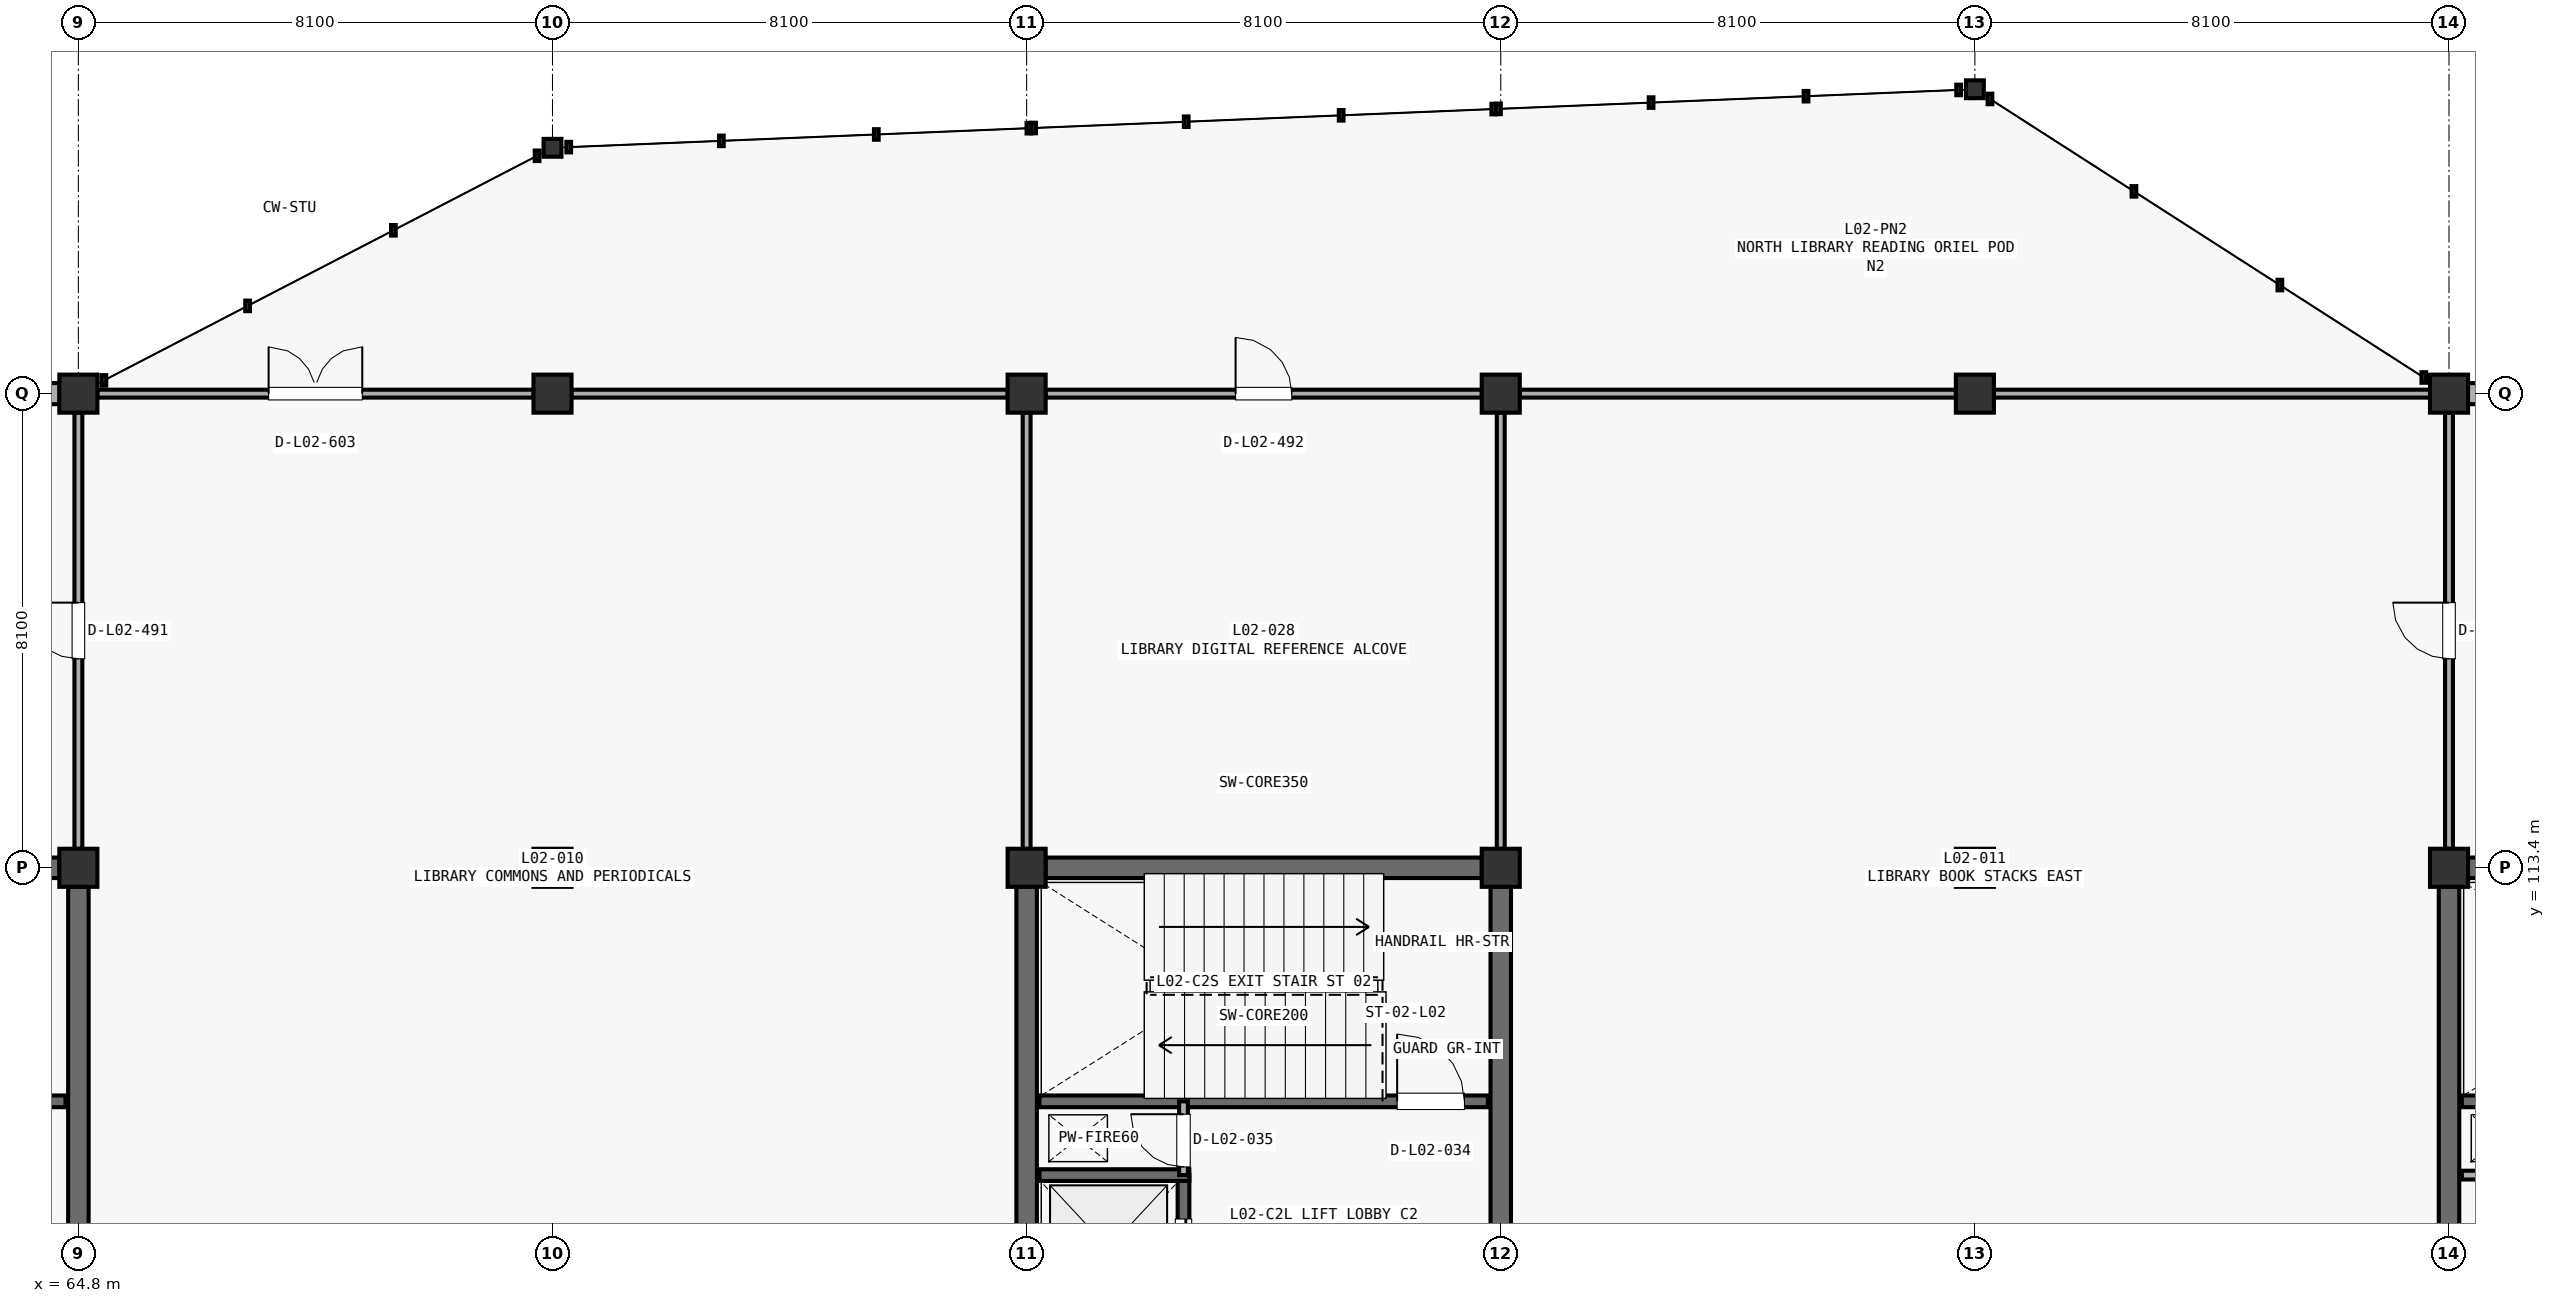
"""IFC4 building model, lengths in metres.
Left out: names, types, materials, properties, quantities, classifications, styles, units other than length and angle.
Written with IfcOpenShell. Run it as: python <this file> out.ifc"""

import sys

from ifc_helpers import new_model, si_unit, direction, frame, frame_2d, origin, origin_2d, place, context, subcontext, project, spatial, rectangle, hollow_rectangle, extrude, element, fill, save


model = new_model("IFC4")
c1 = context("Model", 3, precision=1e-05, world=origin(), true_north=direction((0.0, 1.0)))
c2 = subcontext(c1, "Body", "Model", "MODEL_VIEW")
j1 = project(units=[si_unit("LENGTHUNIT", "METRE"), si_unit("PLANEANGLEUNIT", "RADIAN")], contexts=[c1])
p1 = place(None, origin())
s1 = spatial("IfcSite", under=j1, at=p1, CompositionType="ELEMENT")
p2 = place(p1, origin())
s2 = spatial("IfcBuilding", under=s1, at=p2, CompositionType="ELEMENT")
p3 = place(p2, frame((0.0, 0.0, 9.69)))
s3 = spatial("IfcBuildingStorey", under=s2, at=p3, CompositionType="ELEMENT", Elevation=9.69)
for number, where, z_axis, x_axis in (
    (1, (64.8, 113.4, 0.0), (0.0, 0.0, 1.0), (1.0, 0.0, 0.0)),
    (2, (64.8, 121.5, 0.0), (0.0, 0.0, 1.0), (1.0, 0.0, 0.0)),
    (3, (72.9, 113.4, 0.0), (0.0, 0.0, 1.0), (1.0, 0.0, 0.0)),
    (4, (72.9, 121.5, 0.0), (0.0, 0.0, 1.0), (1.0, 0.0, 0.0)),
    (5, (81.0, 113.4, 0.0), (0.0, 0.0, 1.0), (1.0, 0.0, 0.0)),
    (6, (81.0, 121.5, 0.0), (0.0, 0.0, 1.0), (1.0, 0.0, 0.0)),
    (7, (89.1, 113.4, 0.0), (0.0, 0.0, 1.0), (1.0, 0.0, 0.0)),
    (8, (89.1, 121.5, 0.0), (0.0, 0.0, 1.0), (1.0, 0.0, 0.0)),
    (9, (97.2, 113.4, 0.0), (0.0, 0.0, 1.0), (1.0, 0.0, 0.0)),
    (10, (97.2, 121.5, 0.0), (0.0, 0.0, 1.0), (1.0, 0.0, 0.0)),
    (11, (105.3, 113.4, 0.0), (0.0, 0.0, 1.0), (1.0, 0.0, 0.0)),
    (12, (105.3, 121.5, 0.0), (0.0, 0.0, 1.0), (1.0, 0.0, 0.0)),
):
    element("IfcColumn", number, at=place(p3, frame(where, z_axis=z_axis, x_axis=x_axis)), inside=s3, PredefinedType="COLUMN", context=c2, shape_type="SweptSolid", body=[
        extrude(rectangle(XDim=0.65, YDim=0.65, at=origin_2d()), origin(), (0.0, 0.0, 1.0), 4.42),
    ])
for number, where, z_axis, x_axis in (
    (13, (72.9, 125.7, 0.0), (0.0, 0.0, 1.0), (1.0, 0.0, 0.0)),
    (14, (97.2, 126.7, 0.0), (0.0, 0.0, 1.0), (1.0, 0.0, 0.0)),
):
    element("IfcColumn", number, at=place(p3, frame(where, z_axis=z_axis, x_axis=x_axis)), inside=s3, PredefinedType="COLUMN", context=c2, shape_type="SweptSolid", body=[
        extrude(hollow_rectangle(XDim=0.305, YDim=0.305, WallThickness=0.013, InnerFilletRadius=0.013, OuterFilletRadius=0.025, at=origin_2d()), origin(), (0.0, 0.0, 1.0), 4.42),
    ])
p4 = place(p3, frame((57.023, 121.5, 0.0), z_axis=(0.0, 0.0, 1.0), x_axis=(1.0, 0.0, 0.0)))
e15 = element("IfcWall", 15, at=p4, inside=s3, PredefinedType="STANDARD", context=c2, shape_type="SweptSolid", body=[
    extrude(rectangle(XDim=7.454, YDim=0.36, at=frame_2d((3.727, 0.0))), origin(), (0.0, 0.0, 1.0), 3.332),
])
p5 = place(p4, frame((3.002, 0.0, 0.85)))
e16 = element("IfcOpeningElement", 16, at=p5, cuts=e15, PredefinedType="OPENING", context=c2, shape_type="SweptSolid", body=[
    extrude(rectangle(XDim=1.45, YDim=1.7, at=frame_2d((0.725, 0.85))), frame((0.0, 0.19, 0.0), z_axis=(0.0, -1.0, 0.0), x_axis=(1.0, 0.0, 0.0)), (0.0, 0.0, 1.0), 0.38),
])
p6 = place(p3, frame((105.623, 121.5, 0.0), z_axis=(0.0, 0.0, 1.0), x_axis=(1.0, 0.0, 0.0)))
e17 = element("IfcWall", 17, at=p6, inside=s3, PredefinedType="STANDARD", context=c2, shape_type="SweptSolid", body=[
    extrude(rectangle(XDim=7.454, YDim=0.36, at=frame_2d((3.727, 0.0))), origin(), (0.0, 0.0, 1.0), 3.492),
])
p7 = place(p6, frame((2.352, 0.0, 0.85)))
e18 = element("IfcOpeningElement", 18, at=p7, cuts=e17, PredefinedType="OPENING", context=c2, shape_type="SweptSolid", body=[
    extrude(rectangle(XDim=2.75, YDim=1.7, at=frame_2d((1.375, 0.85))), frame((0.0, 0.19, 0.0), z_axis=(0.0, -1.0, 0.0), x_axis=(1.0, 0.0, 0.0)), (0.0, 0.0, 1.0), 0.38),
])
p8 = place(p3, frame((81.323, 113.4, 0.0), z_axis=(0.0, 0.0, 1.0), x_axis=(1.0, 0.0, 0.0)))
e19 = element("IfcWall", 19, at=p8, inside=s3, PredefinedType="SHEAR", context=c2, shape_type="SweptSolid", body=[
    extrude(rectangle(XDim=7.454, YDim=0.35, at=frame_2d((3.727, 0.0))), origin(), (0.0, 0.0, 1.0), 4.142),
])
for number, where, z_axis, x_axis in (
    (20, (81.0, 105.623, 0.0), (0.0, 0.0, 1.0), (0.0, 1.0, 0.0)),
    (21, (89.1, 105.623, 0.0), (0.0, 0.0, 1.0), (0.0, 1.0, 0.0)),
):
    element("IfcWall", number, at=place(p3, frame(where, z_axis=z_axis, x_axis=x_axis)), inside=s3, PredefinedType="SHEAR", context=c2, shape_type="SweptSolid", body=[
        extrude(rectangle(XDim=7.454, YDim=0.35, at=frame_2d((3.727, 0.0))), origin(), (0.0, 0.0, 1.0), 4.142),
    ])
p9 = place(p3, frame((81.22, 109.41, 0.0), z_axis=(0.0, 0.0, 1.0), x_axis=(1.0, 0.0, 0.0)))
e22 = element("IfcWall", 22, at=p9, inside=s3, PredefinedType="SHEAR", context=c2, shape_type="SweptSolid", body=[
    extrude(rectangle(XDim=7.66, YDim=0.2, at=frame_2d((3.83, 0.0))), origin(), (0.0, 0.0, 1.0), 4.142),
])
p10 = place(p9, frame((6.11, 0.0, 0.0)))
e23 = element("IfcOpeningElement", 23, at=p10, cuts=e22, PredefinedType="OPENING", context=c2, shape_type="SweptSolid", body=[
    extrude(rectangle(XDim=1.15, YDim=2.2, at=frame_2d((0.575, 1.1))), frame((0.0, 0.11, 0.0), z_axis=(0.0, -1.0, 0.0), x_axis=(1.0, 0.0, 0.0)), (0.0, 0.0, 1.0), 0.22),
])
p11 = place(p3, frame((83.68, 105.55, 0.0), z_axis=(0.0, 0.0, 1.0), x_axis=(0.0, 1.0, 0.0)))
e24 = element("IfcWall", 24, at=p11, inside=s3, PredefinedType="SHEAR", context=c2, shape_type="SweptSolid", body=[
    extrude(rectangle(XDim=2.6, YDim=0.2, at=frame_2d((1.3, 0.0))), origin(), (0.0, 0.0, 1.0), 4.142),
])
p12 = place(p11, frame((0.75, 0.0, 0.0)))
e25 = element("IfcOpeningElement", 25, at=p12, cuts=e24, PredefinedType="OPENING", context=c2, shape_type="SweptSolid", body=[
    extrude(rectangle(XDim=1.1, YDim=2.2, at=frame_2d((0.55, 1.1))), frame((0.0, 0.11, 0.0), z_axis=(0.0, -1.0, 0.0), x_axis=(1.0, 0.0, 0.0)), (0.0, 0.0, 1.0), 0.22),
])
p13 = place(p3, frame((81.22, 108.15, 0.0), z_axis=(0.0, 0.0, 1.0), x_axis=(1.0, 0.0, 0.0)))
e26 = element("IfcWall", 26, at=p13, inside=s3, PredefinedType="SHEAR", context=c2, shape_type="SweptSolid", body=[
    extrude(rectangle(XDim=2.56, YDim=0.2, at=frame_2d((1.28, 0.0))), origin(), (0.0, 0.0, 1.0), 4.142),
])
p14 = place(p3, frame((83.68, 108.15, 0.0), z_axis=(0.0, 0.0, 1.0), x_axis=(0.0, 1.0, 0.0)))
e27 = element("IfcWall", 27, at=p14, inside=s3, PredefinedType="PARTITIONING", context=c2, shape_type="SweptSolid", body=[
    extrude(rectangle(XDim=1.26, YDim=0.15, at=frame_2d((0.63, 0.0))), origin(), (0.0, 0.0, 1.0), 4.142),
])
p15 = place(p14, frame((0.14, 0.0, 0.0)))
e28 = element("IfcOpeningElement", 28, at=p15, cuts=e27, PredefinedType="OPENING", context=c2, shape_type="SweptSolid", body=[
    extrude(rectangle(XDim=0.9, YDim=2.15, at=frame_2d((0.45, 1.075))), frame((0.0, 0.085, 0.0), z_axis=(0.0, -1.0, 0.0), x_axis=(1.0, 0.0, 0.0)), (0.0, 0.0, 1.0), 0.17),
])
p16 = place(p3, frame((57.023, 113.4, 0.0), z_axis=(0.0, 0.0, 1.0), x_axis=(1.0, 0.0, 0.0)))
e29 = element("IfcWall", 29, at=p16, inside=s3, PredefinedType="SHEAR", context=c2, shape_type="SweptSolid", body=[
    extrude(rectangle(XDim=7.454, YDim=0.35, at=frame_2d((3.727, 0.0))), origin(), (0.0, 0.0, 1.0), 4.082),
])
p17 = place(p3, frame((64.8, 105.623, 0.0), z_axis=(0.0, 0.0, 1.0), x_axis=(0.0, 1.0, 0.0)))
e30 = element("IfcWall", 30, at=p17, inside=s3, PredefinedType="SHEAR", context=c2, shape_type="SweptSolid", body=[
    extrude(rectangle(XDim=7.454, YDim=0.35, at=frame_2d((3.727, 0.0))), origin(), (0.0, 0.0, 1.0), 4.082),
])
p18 = place(p3, frame((56.92, 109.41, 0.0), z_axis=(0.0, 0.0, 1.0), x_axis=(1.0, 0.0, 0.0)))
e31 = element("IfcWall", 31, at=p18, inside=s3, PredefinedType="SHEAR", context=c2, shape_type="SweptSolid", body=[
    extrude(rectangle(XDim=7.66, YDim=0.2, at=frame_2d((3.83, 0.0))), origin(), (0.0, 0.0, 1.0), 4.082),
])
p19 = place(p18, frame((6.11, 0.0, 0.0)))
e32 = element("IfcOpeningElement", 32, at=p19, cuts=e31, PredefinedType="OPENING", context=c2, shape_type="SweptSolid", body=[
    extrude(rectangle(XDim=1.15, YDim=2.2, at=frame_2d((0.575, 1.1))), frame((0.0, 0.11, 0.0), z_axis=(0.0, -1.0, 0.0), x_axis=(1.0, 0.0, 0.0)), (0.0, 0.0, 1.0), 0.22),
])
for number, where, z_axis, x_axis in (
    (33, (105.623, 113.4, 0.0), (0.0, 0.0, 1.0), (1.0, 0.0, 0.0)),
    (34, (105.3, 105.623, 0.0), (0.0, 0.0, 1.0), (0.0, 1.0, 0.0)),
):
    element("IfcWall", number, at=place(p3, frame(where, z_axis=z_axis, x_axis=x_axis)), inside=s3, PredefinedType="SHEAR", context=c2, shape_type="SweptSolid", body=[
        extrude(rectangle(XDim=7.454, YDim=0.35, at=frame_2d((3.727, 0.0))), origin(), (0.0, 0.0, 1.0), 4.142),
    ])
p20 = place(p3, frame((105.52, 109.41, 0.0), z_axis=(0.0, 0.0, 1.0), x_axis=(1.0, 0.0, 0.0)))
e35 = element("IfcWall", 35, at=p20, inside=s3, PredefinedType="SHEAR", context=c2, shape_type="SweptSolid", body=[
    extrude(rectangle(XDim=7.66, YDim=0.2, at=frame_2d((3.83, 0.0))), origin(), (0.0, 0.0, 1.0), 4.142),
])
p21 = place(p20, frame((6.11, 0.0, 0.0)))
e36 = element("IfcOpeningElement", 36, at=p21, cuts=e35, PredefinedType="OPENING", context=c2, shape_type="SweptSolid", body=[
    extrude(rectangle(XDim=1.15, YDim=2.2, at=frame_2d((0.575, 1.1))), frame((0.0, 0.11, 0.0), z_axis=(0.0, -1.0, 0.0), x_axis=(1.0, 0.0, 0.0)), (0.0, 0.0, 1.0), 0.22),
])
p22 = place(p3, frame((105.52, 108.15, 0.0), z_axis=(0.0, 0.0, 1.0), x_axis=(1.0, 0.0, 0.0)))
e37 = element("IfcWall", 37, at=p22, inside=s3, PredefinedType="PARTITIONING", context=c2, shape_type="SweptSolid", body=[
    extrude(rectangle(XDim=2.53, YDim=0.15, at=frame_2d((1.265, 0.0))), origin(), (0.0, 0.0, 1.0), 4.142),
])
p23 = place(p3, frame((81.0, 113.723, 0.0), z_axis=(0.0, 0.0, 1.0), x_axis=(0.0, 1.0, 0.0)))
e38 = element("IfcWall", 38, at=p23, inside=s3, PredefinedType="PARTITIONING", context=c2, shape_type="SweptSolid", body=[
    extrude(rectangle(XDim=7.454, YDim=0.135, at=frame_2d((3.727, 0.0))), origin(), (0.0, 0.0, 1.0), 3.542),
])
p24 = place(p3, frame((64.8, 113.723, 0.0), z_axis=(0.0, 0.0, 1.0), x_axis=(0.0, 1.0, 0.0)))
e39 = element("IfcWall", 39, at=p24, inside=s3, PredefinedType="PARTITIONING", context=c2, shape_type="SweptSolid", body=[
    extrude(rectangle(XDim=7.454, YDim=0.135, at=frame_2d((3.727, 0.0))), origin(), (0.0, 0.0, 1.0), 3.232),
])
p25 = place(p24, frame((3.247, 0.0, 0.0)))
e40 = element("IfcOpeningElement", 40, at=p25, cuts=e39, PredefinedType="OPENING", context=c2, shape_type="SweptSolid", body=[
    extrude(rectangle(XDim=0.96, YDim=2.15, at=frame_2d((0.48, 1.075))), frame((0.0, 0.078, 0.0), z_axis=(0.0, -1.0, 0.0), x_axis=(1.0, 0.0, 0.0)), (0.0, 0.0, 1.0), 0.155),
])
p26 = place(p3, frame((65.123, 121.5, 0.0), z_axis=(0.0, 0.0, 1.0), x_axis=(1.0, 0.0, 0.0)))
e41 = element("IfcWall", 41, at=p26, inside=s3, PredefinedType="PARTITIONING", context=c2, shape_type="SweptSolid", body=[
    extrude(rectangle(XDim=7.454, YDim=0.135, at=frame_2d((3.727, 0.0))), origin(), (0.0, 0.0, 1.0), 3.492),
])
p27 = place(p26, frame((2.927, 0.0, 0.0)))
e42 = element("IfcOpeningElement", 42, at=p27, cuts=e41, PredefinedType="OPENING", context=c2, shape_type="SweptSolid", body=[
    extrude(rectangle(XDim=1.6, YDim=2.2, at=frame_2d((0.8, 1.1))), frame((0.0, 0.078, 0.0), z_axis=(0.0, -1.0, 0.0), x_axis=(1.0, 0.0, 0.0)), (0.0, 0.0, 1.0), 0.155),
])
p28 = place(p3, frame((73.223, 121.5, 0.0), z_axis=(0.0, 0.0, 1.0), x_axis=(1.0, 0.0, 0.0)))
e43 = element("IfcWall", 43, at=p28, inside=s3, PredefinedType="PARTITIONING", context=c2, shape_type="SweptSolid", body=[
    extrude(rectangle(XDim=7.454, YDim=0.135, at=frame_2d((3.727, 0.0))), origin(), (0.0, 0.0, 1.0), 3.727),
])
p29 = place(p3, frame((105.3, 113.723, 0.0), z_axis=(0.0, 0.0, 1.0), x_axis=(0.0, 1.0, 0.0)))
e44 = element("IfcWall", 44, at=p29, inside=s3, PredefinedType="PARTITIONING", context=c2, shape_type="SweptSolid", body=[
    extrude(rectangle(XDim=7.454, YDim=0.135, at=frame_2d((3.727, 0.0))), origin(), (0.0, 0.0, 1.0), 3.292),
])
p30 = place(p29, frame((3.247, 0.0, 0.0)))
e45 = element("IfcOpeningElement", 45, at=p30, cuts=e44, PredefinedType="OPENING", context=c2, shape_type="SweptSolid", body=[
    extrude(rectangle(XDim=0.96, YDim=2.15, at=frame_2d((0.48, 1.075))), frame((0.0, 0.078, 0.0), z_axis=(0.0, -1.0, 0.0), x_axis=(1.0, 0.0, 0.0)), (0.0, 0.0, 1.0), 0.155),
])
p31 = place(p3, frame((89.1, 113.723, 0.0), z_axis=(0.0, 0.0, 1.0), x_axis=(0.0, 1.0, 0.0)))
e46 = element("IfcWall", 46, at=p31, inside=s3, PredefinedType="PARTITIONING", context=c2, shape_type="SweptSolid", body=[
    extrude(rectangle(XDim=7.454, YDim=0.135, at=frame_2d((3.727, 0.0))), origin(), (0.0, 0.0, 1.0), 3.192),
])
p32 = place(p3, frame((89.423, 121.5, 0.0), z_axis=(0.0, 0.0, 1.0), x_axis=(1.0, 0.0, 0.0)))
e47 = element("IfcWall", 47, at=p32, inside=s3, PredefinedType="PARTITIONING", context=c2, shape_type="SweptSolid", body=[
    extrude(rectangle(XDim=7.454, YDim=0.135, at=frame_2d((3.727, 0.0))), origin(), (0.0, 0.0, 1.0), 3.192),
])
p33 = place(p3, frame((97.523, 121.5, 0.0), z_axis=(0.0, 0.0, 1.0), x_axis=(1.0, 0.0, 0.0)))
e48 = element("IfcWall", 48, at=p33, inside=s3, PredefinedType="PARTITIONING", context=c2, shape_type="SweptSolid", body=[
    extrude(rectangle(XDim=7.454, YDim=0.135, at=frame_2d((3.727, 0.0))), origin(), (0.0, 0.0, 1.0), 3.492),
])
p34 = place(p3, frame((81.323, 121.5, 0.0), z_axis=(0.0, 0.0, 1.0), x_axis=(1.0, 0.0, 0.0)))
e49 = element("IfcWall", 49, at=p34, inside=s3, PredefinedType="PARTITIONING", context=c2, shape_type="SweptSolid", body=[
    extrude(rectangle(XDim=7.454, YDim=0.135, at=frame_2d((3.727, 0.0))), origin(), (0.0, 0.0, 1.0), 3.292),
])
p35 = place(p34, frame((3.247, 0.0, 0.0)))
e50 = element("IfcOpeningElement", 50, at=p35, cuts=e49, PredefinedType="OPENING", context=c2, shape_type="SweptSolid", body=[
    extrude(rectangle(XDim=0.96, YDim=2.15, at=frame_2d((0.48, 1.075))), frame((0.0, 0.078, 0.0), z_axis=(0.0, -1.0, 0.0), x_axis=(1.0, 0.0, 0.0)), (0.0, 0.0, 1.0), 0.155),
])
p36 = place(p10, origin())
e51 = element("IfcDoor", 51, at=p36, inside=s3, OperationType="SINGLE_SWING_LEFT", PredefinedType="DOOR", context=c2, shape_type="SweptSolid", body=[
    extrude(rectangle(XDim=1.15, YDim=2.2, at=frame_2d((0.575, 1.1))), frame((0.0, 0.025, 0.0), z_axis=(0.0, -1.0, 0.0), x_axis=(1.0, 0.0, 0.0)), (0.0, 0.0, 1.0), 0.05),
])
fill(e23, e51)
p37 = place(p12, origin())
e52 = element("IfcDoor", 52, at=p37, inside=s3, OperationType="SLIDING_TO_LEFT", PredefinedType="DOOR", context=c2, shape_type="SweptSolid", body=[
    extrude(rectangle(XDim=1.1, YDim=2.2, at=frame_2d((0.55, 1.1))), frame((0.0, 0.025, 0.0), z_axis=(0.0, -1.0, 0.0), x_axis=(1.0, 0.0, 0.0)), (0.0, 0.0, 1.0), 0.05),
])
fill(e25, e52)
p38 = place(p15, origin())
e53 = element("IfcDoor", 53, at=p38, inside=s3, OperationType="SINGLE_SWING_RIGHT", PredefinedType="DOOR", context=c2, shape_type="SweptSolid", body=[
    extrude(rectangle(XDim=0.9, YDim=2.15, at=frame_2d((0.45, 1.075))), frame((0.0, 0.025, 0.0), z_axis=(0.0, -1.0, 0.0), x_axis=(1.0, 0.0, 0.0)), (0.0, 0.0, 1.0), 0.05),
])
fill(e28, e53)
p39 = place(p25, origin())
e54 = element("IfcDoor", 54, at=p39, inside=s3, OperationType="SINGLE_SWING_RIGHT", PredefinedType="DOOR", context=c2, shape_type="SweptSolid", body=[
    extrude(rectangle(XDim=0.96, YDim=2.15, at=frame_2d((0.48, 1.075))), frame((0.0, 0.025, 0.0), z_axis=(0.0, -1.0, 0.0), x_axis=(1.0, 0.0, 0.0)), (0.0, 0.0, 1.0), 0.05),
])
fill(e40, e54)
p40 = place(p35, origin())
e55 = element("IfcDoor", 55, at=p40, inside=s3, OperationType="SINGLE_SWING_LEFT", PredefinedType="DOOR", context=c2, shape_type="SweptSolid", body=[
    extrude(rectangle(XDim=0.96, YDim=2.15, at=frame_2d((0.48, 1.075))), frame((0.0, 0.025, 0.0), z_axis=(0.0, -1.0, 0.0), x_axis=(1.0, 0.0, 0.0)), (0.0, 0.0, 1.0), 0.05),
])
fill(e50, e55)
p41 = place(p30, origin())
e56 = element("IfcDoor", 56, at=p41, inside=s3, OperationType="SINGLE_SWING_RIGHT", PredefinedType="DOOR", context=c2, shape_type="SweptSolid", body=[
    extrude(rectangle(XDim=0.96, YDim=2.15, at=frame_2d((0.48, 1.075))), frame((0.0, 0.025, 0.0), z_axis=(0.0, -1.0, 0.0), x_axis=(1.0, 0.0, 0.0)), (0.0, 0.0, 1.0), 0.05),
])
fill(e45, e56)
p42 = place(p27, origin())
e57 = element("IfcDoor", 57, at=p42, inside=s3, OperationType="DOUBLE_SWING_LEFT", PredefinedType="DOOR", context=c2, shape_type="SweptSolid", body=[
    extrude(rectangle(XDim=1.6, YDim=2.2, at=frame_2d((0.8, 1.1))), frame((0.0, 0.025, 0.0), z_axis=(0.0, -1.0, 0.0), x_axis=(1.0, 0.0, 0.0)), (0.0, 0.0, 1.0), 0.05),
])
fill(e42, e57)
save(model, sys.argv[1])
